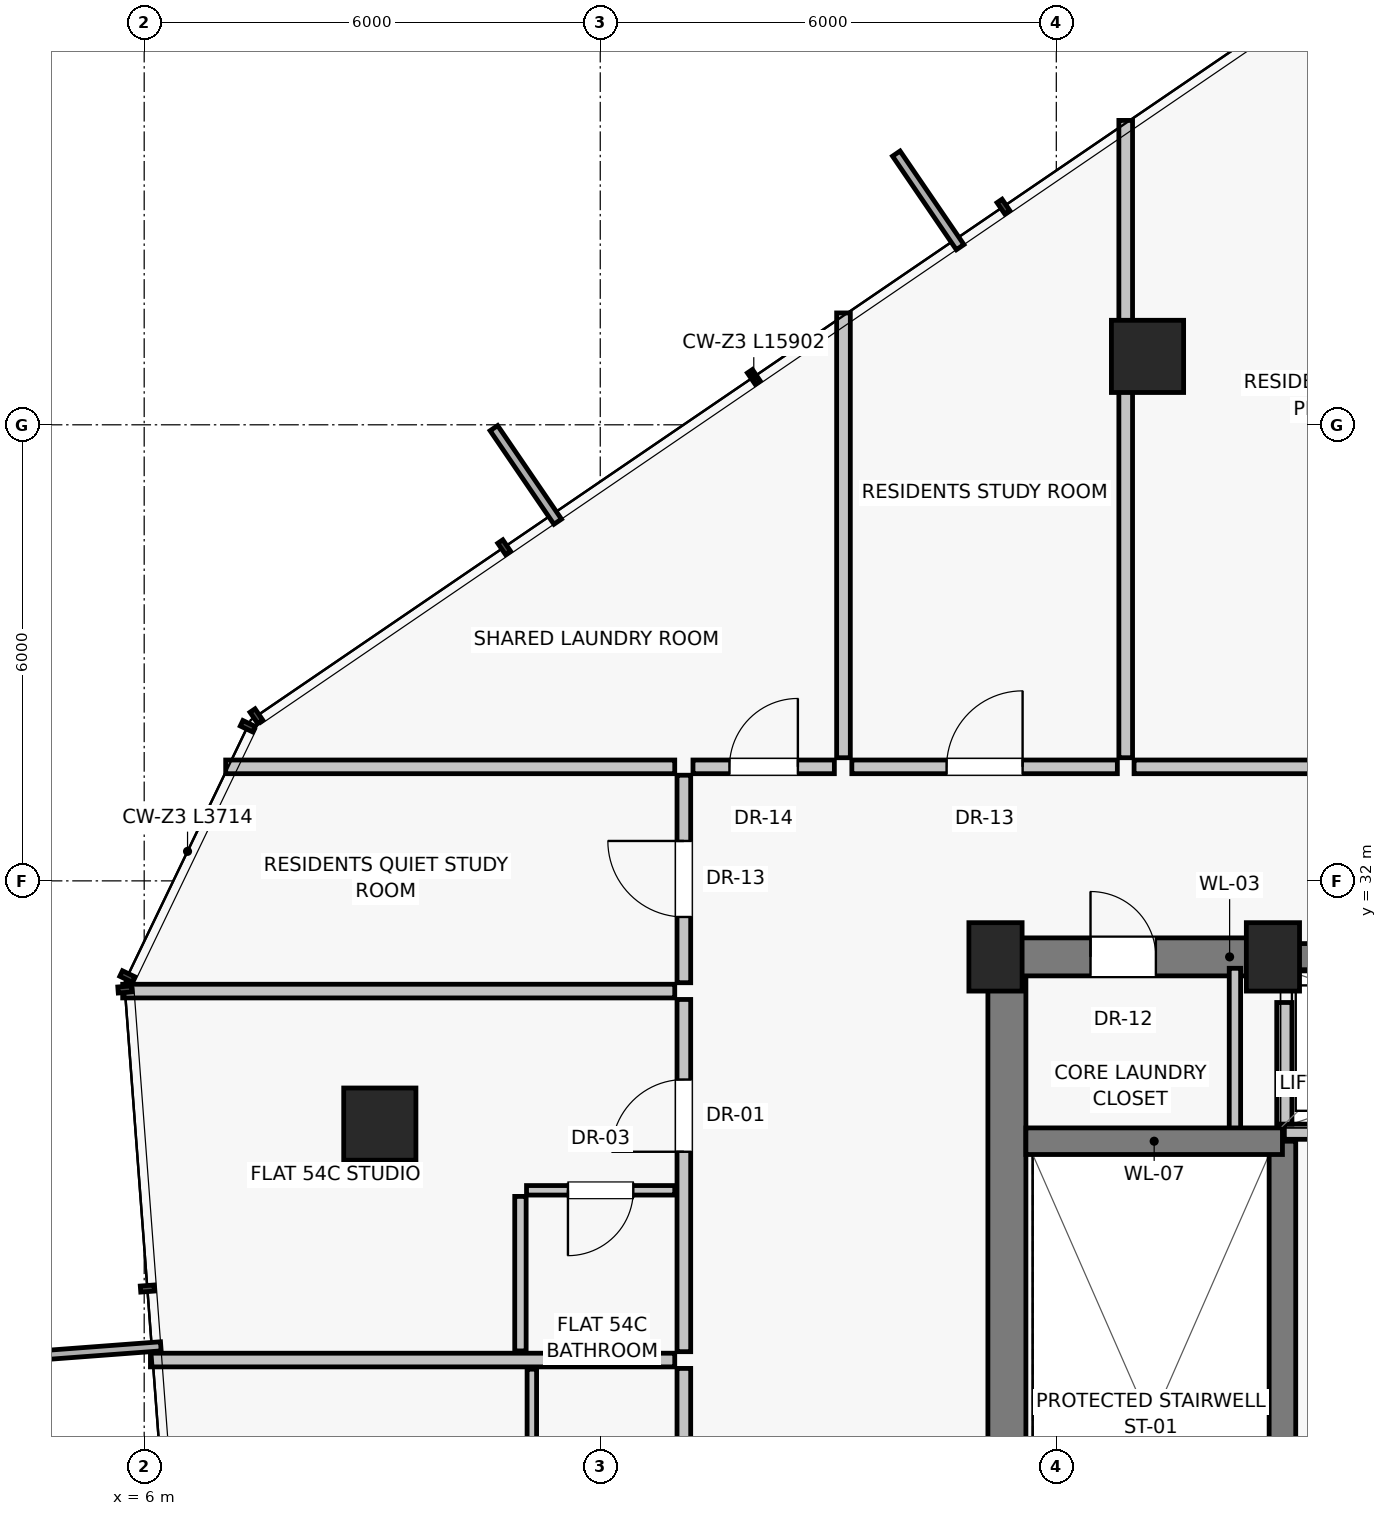
"""IFC4 building model, lengths in metres.
Left out: names, types, materials, properties, quantities, classifications, styles, units other than length and angle.
Written with IfcOpenShell. Run it as: python <this file> out.ifc"""

import sys

from ifc_helpers import new_model, si_unit, direction, frame, frame_2d, origin, origin_2d, place, context, subcontext, project, spatial, rectangle, extrude, source, transform, mapped, element, fill, save


model = new_model("IFC4")
c1 = context("Model", 3, precision=1e-05, world=origin(), true_north=direction((0.0, 1.0)))
c2 = subcontext(c1, "Body", "Model", "MODEL_VIEW")
j1 = project(units=[si_unit("LENGTHUNIT", "METRE"), si_unit("PLANEANGLEUNIT", "RADIAN")], contexts=[c1])
p1 = place(None, origin())
s1 = spatial("IfcSite", under=j1, at=p1, CompositionType="ELEMENT")
p2 = place(p1, origin())
s2 = spatial("IfcBuilding", under=s1, at=p2, CompositionType="ELEMENT")
p3 = place(p2, frame((0.0, 0.0, 191.85)))
s3 = spatial("IfcBuildingStorey", under=s2, at=p3, CompositionType="ELEMENT", Elevation=191.85)
for number, where, z_axis, x_axis in (
    (1, (17.2, 31.0, 0.0), (0.0, 0.0, 1.0), (1.0, 0.0, 0.0)),
    (2, (20.85, 31.0, 0.0), (0.0, 0.0, 1.0), (1.0, 0.0, 0.0)),
):
    element("IfcColumn", number, at=place(p3, frame(where, z_axis=z_axis, x_axis=x_axis)), inside=s3, PredefinedType="PILASTER", context=c2, shape_type="SweptSolid", body=[
        extrude(rectangle(XDim=0.7, YDim=0.9, at=origin_2d()), origin(), (0.0, 0.0, 1.0), 3.25),
    ])
for number, where, z_axis, x_axis in (
    (3, (19.2, 38.9, 0.0), (0.0, 0.0, 1.0), (1.0, 0.0, 0.0)),
    (4, (9.1, 28.8, 0.0), (0.0, 0.0, 1.0), (1.0, 0.0, 0.0)),
):
    element("IfcColumn", number, at=place(p3, frame(where, z_axis=z_axis, x_axis=x_axis)), inside=s3, PredefinedType="COLUMN", context=c2, shape_type="SweptSolid", body=[
        extrude(rectangle(XDim=0.95, YDim=0.95, at=origin_2d()), origin(), (0.0, 0.0, 1.0), 3.25),
    ])
p4 = place(p3, frame((17.35, 16.8, 0.0), z_axis=(0.0, 0.0, 1.0), x_axis=(0.0, 1.0, 0.0)))
e5 = element("IfcWall", 5, at=p4, inside=s3, PredefinedType="SHEAR", context=c2, shape_type="SweptSolid", body=[
    extrude(rectangle(XDim=14.2, YDim=0.5, at=frame_2d((7.1, 0.0))), origin(), (0.0, 0.0, 1.0), 3.015),
])
p5 = place(p3, frame((17.2, 31.0, 0.0), z_axis=(0.0, 0.0, 1.0), x_axis=(1.0, 0.0, 0.0)))
e6 = element("IfcWall", 6, at=p5, inside=s3, PredefinedType="SHEAR", context=c2, shape_type="SweptSolid", body=[
    extrude(rectangle(XDim=3.8, YDim=0.5, at=frame_2d((1.9, 0.0))), origin(), (0.0, 0.0, 1.0), 3.015),
])
p6 = place(p5, frame((1.25, 0.0, 0.0)))
e7 = element("IfcOpeningElement", 7, at=p6, cuts=e6, PredefinedType="OPENING", context=c2, shape_type="SweptSolid", body=[
    extrude(rectangle(XDim=0.86, YDim=2.01, at=frame_2d((0.43, 1.005))), frame((0.0, 0.26, 0.0), z_axis=(0.0, -1.0, 0.0), x_axis=(1.0, 0.0, 0.0)), (0.0, 0.0, 1.0), 0.52),
])
p7 = place(p3, frame((21.0, 31.0, 0.0), z_axis=(0.0, 0.0, 1.0), x_axis=(1.0, 0.0, 0.0)))
e8 = element("IfcWall", 8, at=p7, inside=s3, PredefinedType="SHEAR", context=c2, shape_type="SweptSolid", body=[
    extrude(rectangle(XDim=6.0, YDim=0.35, at=frame_2d((3.0, 0.0))), origin(), (0.0, 0.0, 1.0), 3.015),
])
p8 = place(p7, frame((0.5, 0.0, 0.0)))
e9 = element("IfcOpeningElement", 9, at=p8, cuts=e8, PredefinedType="OPENING", context=c2, shape_type="SweptSolid", body=[
    extrude(rectangle(XDim=1.1, YDim=2.08, at=frame_2d((0.55, 1.04))), frame((0.0, 0.185, 0.0), z_axis=(0.0, -1.0, 0.0), x_axis=(1.0, 0.0, 0.0)), (0.0, 0.0, 1.0), 0.37),
])
p9 = place(p7, frame((2.45, 0.0, 0.0)))
e10 = element("IfcOpeningElement", 10, at=p9, cuts=e8, PredefinedType="OPENING", context=c2, shape_type="SweptSolid", body=[
    extrude(rectangle(XDim=1.1, YDim=2.08, at=frame_2d((0.55, 1.04))), frame((0.0, 0.185, 0.0), z_axis=(0.0, -1.0, 0.0), x_axis=(1.0, 0.0, 0.0)), (0.0, 0.0, 1.0), 0.37),
])
p10 = place(p7, frame((4.4, 0.0, 0.0)))
e11 = element("IfcOpeningElement", 11, at=p10, cuts=e8, PredefinedType="OPENING", context=c2, shape_type="SweptSolid", body=[
    extrude(rectangle(XDim=1.1, YDim=2.08, at=frame_2d((0.55, 1.04))), frame((0.0, 0.185, 0.0), z_axis=(0.0, -1.0, 0.0), x_axis=(1.0, 0.0, 0.0)), (0.0, 0.0, 1.0), 0.37),
])
p11 = place(p3, frame((20.35, 28.65, 0.0), z_axis=(0.0, 0.0, 1.0), x_axis=(0.0, 1.0, 0.0)))
e12 = element("IfcWall", 12, at=p11, inside=s3, PredefinedType="PARTITIONING", context=c2, shape_type="SweptSolid", body=[
    extrude(rectangle(XDim=2.2, YDim=0.15, at=frame_2d((1.1, 0.0))), origin(), (0.0, 0.0, 1.0), 3.015),
])
p12 = place(p3, frame((20.975, 19.8, 0.0), z_axis=(0.0, 0.0, 1.0), x_axis=(0.0, 1.0, 0.0)))
e13 = element("IfcWall", 13, at=p12, inside=s3, PredefinedType="SHEAR", context=c2, shape_type="SweptSolid", body=[
    extrude(rectangle(XDim=8.775, YDim=0.35, at=frame_2d((4.387, 0.0))), origin(), (0.0, 0.0, 1.0), 3.015),
])
p13 = place(p3, frame((17.6, 28.575, 0.0), z_axis=(0.0, 0.0, 1.0), x_axis=(1.0, 0.0, 0.0)))
e14 = element("IfcWall", 14, at=p13, inside=s3, PredefinedType="SHEAR", context=c2, shape_type="SweptSolid", body=[
    extrude(rectangle(XDim=3.375, YDim=0.35, at=frame_2d((1.688, 0.0))), origin(), (0.0, 0.0, 1.0), 3.015),
])
p14 = place(p3, frame((21.0, 28.7, 0.0), z_axis=(0.0, 0.0, 1.0), x_axis=(1.0, 0.0, 0.0)))
e15 = element("IfcWall", 15, at=p14, inside=s3, PredefinedType="SOLIDWALL", context=c2, shape_type="SweptSolid", body=[
    extrude(rectangle(XDim=6.0, YDim=0.2, at=frame_2d((3.0, 0.0))), origin(), (0.0, 0.0, 1.0), 3.015),
])
p15 = place(p3, frame((21.0, 28.8, 0.0), z_axis=(0.0, 0.0, 1.0), x_axis=(0.0, 1.0, 0.0)))
e16 = element("IfcWall", 16, at=p15, inside=s3, PredefinedType="SOLIDWALL", context=c2, shape_type="SweptSolid", body=[
    extrude(rectangle(XDim=1.6, YDim=0.2, at=frame_2d((0.8, 0.0))), origin(), (0.0, 0.0, 1.0), 3.015),
])
p16 = place(p3, frame((15.2, 33.62, 0.0), z_axis=(0.0, 0.0, 1.0), x_axis=(0.0, 1.0, 0.0)))
e17 = element("IfcWall", 17, at=p16, inside=s3, PredefinedType="PARTITIONING", context=c2, shape_type="SweptSolid", body=[
    extrude(rectangle(XDim=5.852, YDim=0.18, at=frame_2d((2.926, 0.0))), origin(), (0.0, 0.0, 1.0), 3.015),
])
p17 = place(p3, frame((15.31, 33.5, 0.0), z_axis=(0.0, 0.0, 1.0), x_axis=(1.0, 0.0, 0.0)))
e18 = element("IfcWall", 18, at=p17, inside=s3, PredefinedType="PARTITIONING", context=c2, shape_type="SweptSolid", body=[
    extrude(rectangle(XDim=3.493, YDim=0.18, at=frame_2d((1.747, 0.0))), origin(), (0.0, 0.0, 1.0), 3.015),
])
p18 = place(p17, frame((1.247, 0.0, 0.0)))
e19 = element("IfcOpeningElement", 19, at=p18, cuts=e18, PredefinedType="OPENING", context=c2, shape_type="SweptSolid", body=[
    extrude(rectangle(XDim=1.0, YDim=2.01, at=frame_2d((0.5, 1.005))), frame((0.0, 0.1, 0.0), z_axis=(0.0, -1.0, 0.0), x_axis=(1.0, 0.0, 0.0)), (0.0, 0.0, 1.0), 0.2),
])
p19 = place(p3, frame((19.023, 33.5, 0.0), z_axis=(0.0, 0.0, 1.0), x_axis=(1.0, 0.0, 0.0)))
e20 = element("IfcWall", 20, at=p19, inside=s3, PredefinedType="PARTITIONING", context=c2, shape_type="SweptSolid", body=[
    extrude(rectangle(XDim=5.837, YDim=0.18, at=frame_2d((2.918, 0.0))), origin(), (0.0, 0.0, 1.0), 3.015),
])
p20 = place(p19, frame((2.418, 0.0, 0.0)))
e21 = element("IfcOpeningElement", 21, at=p20, cuts=e20, PredefinedType="OPENING", context=c2, shape_type="SweptSolid", body=[
    extrude(rectangle(XDim=1.0, YDim=2.01, at=frame_2d((0.5, 1.005))), frame((0.0, 0.1, 0.0), z_axis=(0.0, -1.0, 0.0), x_axis=(1.0, 0.0, 0.0)), (0.0, 0.0, 1.0), 0.2),
])
p21 = place(p3, frame((18.913, 33.62, 0.0), z_axis=(0.0, 0.0, 1.0), x_axis=(0.0, 1.0, 0.0)))
e22 = element("IfcWall", 22, at=p21, inside=s3, PredefinedType="PARTITIONING", context=c2, shape_type="SweptSolid", body=[
    extrude(rectangle(XDim=8.385, YDim=0.18, at=frame_2d((4.192, 0.0))), origin(), (0.0, 0.0, 1.0), 2.469),
])
p22 = place(p3, frame((12.98, 33.5, 0.0), z_axis=(0.0, 0.0, 1.0), x_axis=(-1.0, 0.0, 0.0)))
e23 = element("IfcWall", 23, at=p22, inside=s3, PredefinedType="PARTITIONING", context=c2, shape_type="SweptSolid", body=[
    extrude(rectangle(XDim=5.908, YDim=0.18, at=frame_2d((2.954, 0.0))), origin(), (0.0, 0.0, 1.0), 3.015),
])
p23 = place(p3, frame((13.1, 14.41, 0.0), z_axis=(0.0, 0.0, 1.0), x_axis=(0.0, 1.0, 0.0)))
e24 = element("IfcWall", 24, at=p23, inside=s3, PredefinedType="PARTITIONING", context=c2, shape_type="SweptSolid", body=[
    extrude(rectangle(XDim=11.176, YDim=0.18, at=frame_2d((5.588, 0.0))), origin(), (0.0, 0.0, 1.0), 2.662),
])
p24 = place(p23, frame((3.674, 0.0, 0.0)))
e25 = element("IfcOpeningElement", 25, at=p24, cuts=e24, PredefinedType="OPENING", context=c2, shape_type="SweptSolid", body=[
    extrude(rectangle(XDim=0.95, YDim=2.02, at=frame_2d((0.475, 1.01))), frame((0.0, 0.1, 0.0), z_axis=(0.0, -1.0, 0.0), x_axis=(1.0, 0.0, 0.0)), (0.0, 0.0, 1.0), 0.2),
])
p25 = place(p3, frame((11.1, 20.668, 0.0), z_axis=(0.0, 0.0, 1.0), x_axis=(0.0, 1.0, 0.0)))
e26 = element("IfcWall", 26, at=p25, inside=s3, PredefinedType="PARTITIONING", context=c2, shape_type="SweptSolid", body=[
    extrude(rectangle(XDim=4.908, YDim=0.125, at=frame_2d((2.454, 0.0))), origin(), (0.0, 0.0, 1.0), 3.015),
])
p26 = place(p3, frame((12.98, 25.696, 0.0), z_axis=(0.0, 0.0, 1.0), x_axis=(-1.0, 0.0, 0.0)))
e27 = element("IfcWall", 27, at=p26, inside=s3, PredefinedType="PARTITIONING", context=c2, shape_type="SweptSolid", body=[
    extrude(rectangle(XDim=6.898, YDim=0.18, at=frame_2d((3.449, 0.0))), origin(), (0.0, 0.0, 1.0), 3.015),
])
p27 = place(p3, frame((13.1, 30.66, 0.0), z_axis=(0.0, 0.0, 1.0), x_axis=(0.0, 1.0, 0.0)))
e28 = element("IfcWall", 28, at=p27, inside=s3, PredefinedType="PARTITIONING", context=c2, shape_type="SweptSolid", body=[
    extrude(rectangle(XDim=2.73, YDim=0.18, at=frame_2d((1.365, 0.0))), origin(), (0.0, 0.0, 1.0), 3.015),
])
p28 = place(p27, frame((0.865, 0.0, 0.0)))
e29 = element("IfcOpeningElement", 29, at=p28, cuts=e28, PredefinedType="OPENING", context=c2, shape_type="SweptSolid", body=[
    extrude(rectangle(XDim=1.0, YDim=2.01, at=frame_2d((0.5, 1.005))), frame((0.0, 0.1, 0.0), z_axis=(0.0, -1.0, 0.0), x_axis=(1.0, 0.0, 0.0)), (0.0, 0.0, 1.0), 0.2),
])
p29 = place(p3, frame((12.98, 30.55, 0.0), z_axis=(0.0, 0.0, 1.0), x_axis=(-1.0, 0.0, 0.0)))
e30 = element("IfcWall", 30, at=p29, inside=s3, PredefinedType="PARTITIONING", context=c2, shape_type="SweptSolid", body=[
    extrude(rectangle(XDim=7.263, YDim=0.18, at=frame_2d((3.631, 0.0))), origin(), (0.0, 0.0, 1.0), 3.015),
])
p30 = place(p3, frame((13.1, 25.806, 0.0), z_axis=(0.0, 0.0, 1.0), x_axis=(0.0, 1.0, 0.0)))
e31 = element("IfcWall", 31, at=p30, inside=s3, PredefinedType="PARTITIONING", context=c2, shape_type="SweptSolid", body=[
    extrude(rectangle(XDim=4.634, YDim=0.18, at=frame_2d((2.317, 0.0))), origin(), (0.0, 0.0, 1.0), 2.662),
])
p31 = place(p30, frame((2.63, 0.0, 0.0)))
e32 = element("IfcOpeningElement", 32, at=p31, cuts=e31, PredefinedType="OPENING", context=c2, shape_type="SweptSolid", body=[
    extrude(rectangle(XDim=0.95, YDim=2.02, at=frame_2d((0.475, 1.01))), frame((0.0, 0.1, 0.0), z_axis=(0.0, -1.0, 0.0), x_axis=(1.0, 0.0, 0.0)), (0.0, 0.0, 1.0), 0.2),
])
p32 = place(p3, frame((12.98, 27.929, 0.0), z_axis=(0.0, 0.0, 1.0), x_axis=(-1.0, 0.0, 0.0)))
e33 = element("IfcWall", 33, at=p32, inside=s3, PredefinedType="PARTITIONING", context=c2, shape_type="SweptSolid", body=[
    extrude(rectangle(XDim=1.95, YDim=0.125, at=frame_2d((0.975, 0.0))), origin(), (0.0, 0.0, 1.0), 3.015),
])
p33 = place(p32, frame((0.545, 0.0, 0.0)))
e34 = element("IfcOpeningElement", 34, at=p33, cuts=e33, PredefinedType="OPENING", context=c2, shape_type="SweptSolid", body=[
    extrude(rectangle(XDim=0.86, YDim=2.01, at=frame_2d((0.43, 1.005))), frame((0.0, 0.073, 0.0), z_axis=(0.0, -1.0, 0.0), x_axis=(1.0, 0.0, 0.0)), (0.0, 0.0, 1.0), 0.145),
])
p34 = place(p3, frame((10.95, 25.816, 0.0), z_axis=(0.0, 0.0, 1.0), x_axis=(0.0, 1.0, 0.0)))
e35 = element("IfcWall", 35, at=p34, inside=s3, PredefinedType="PARTITIONING", context=c2, shape_type="SweptSolid", body=[
    extrude(rectangle(XDim=2.033, YDim=0.15, at=frame_2d((1.017, 0.0))), origin(), (0.0, 0.0, 1.0), 3.015),
])
p35 = place(p3, frame((13.22, 33.5, 0.0), z_axis=(0.0, 0.0, 1.0), x_axis=(1.0, 0.0, 0.0)))
e36 = element("IfcWall", 36, at=p35, inside=s3, PredefinedType="PARTITIONING", context=c2, shape_type="SweptSolid", body=[
    extrude(rectangle(XDim=1.86, YDim=0.18, at=frame_2d((0.93, 0.0))), origin(), (0.0, 0.0, 1.0), 3.015),
])
p36 = place(p35, frame((0.48, 0.0, 0.0)))
e37 = element("IfcOpeningElement", 37, at=p36, cuts=e36, PredefinedType="OPENING", context=c2, shape_type="SweptSolid", body=[
    extrude(rectangle(XDim=0.9, YDim=2.01, at=frame_2d((0.45, 1.005))), frame((0.0, 0.1, 0.0), z_axis=(0.0, -1.0, 0.0), x_axis=(1.0, 0.0, 0.0)), (0.0, 0.0, 1.0), 0.2),
])
m1 = source(origin(), c2, "Body", "SweptSolid", [
    extrude(rectangle(XDim=0.86, YDim=2.01, at=frame_2d((0.43, 1.005))), frame((0.0, 0.025, 0.0), z_axis=(0.0, -1.0, 0.0), x_axis=(1.0, 0.0, 0.0)), (0.0, 0.0, 1.0), 0.05),
])
p37 = place(p6, origin())
e38 = element("IfcDoor", 38, at=p37, inside=s3, OperationType="SINGLE_SWING_LEFT", PredefinedType="DOOR", context=c2, shape_type="MappedRepresentation", body=[
    mapped(m1, transform((0.0, 0.0, 0.0), scale=1.0)),
])
fill(e7, e38)
m2 = source(origin(), c2, "Body", "SweptSolid", [
    extrude(rectangle(XDim=1.0, YDim=2.01, at=frame_2d((0.5, 1.005))), frame((0.0, 0.025, 0.0), z_axis=(0.0, -1.0, 0.0), x_axis=(1.0, 0.0, 0.0)), (0.0, 0.0, 1.0), 0.05),
])
p38 = place(p18, origin())
e39 = element("IfcDoor", 39, at=p38, inside=s3, OperationType="SINGLE_SWING_RIGHT", PredefinedType="DOOR", context=c2, shape_type="MappedRepresentation", body=[
    mapped(m2, transform((0.0, 0.0, 0.0), scale=1.0)),
])
fill(e19, e39)
p39 = place(p28, origin())
e40 = element("IfcDoor", 40, at=p39, inside=s3, OperationType="SINGLE_SWING_RIGHT", PredefinedType="DOOR", context=c2, shape_type="MappedRepresentation", body=[
    mapped(m2, transform((0.0, 0.0, 0.0), scale=1.0)),
])
fill(e29, e40)
m3 = source(origin(), c2, "Body", "SweptSolid", [
    extrude(rectangle(XDim=0.95, YDim=2.02, at=frame_2d((0.475, 1.01))), frame((0.0, 0.025, 0.0), z_axis=(0.0, -1.0, 0.0), x_axis=(1.0, 0.0, 0.0)), (0.0, 0.0, 1.0), 0.05),
])
p40 = place(p31, origin())
e41 = element("IfcDoor", 41, at=p40, inside=s3, OperationType="SINGLE_SWING_LEFT", PredefinedType="DOOR", context=c2, shape_type="MappedRepresentation", body=[
    mapped(m3, transform((0.0, 0.0, 0.0), scale=1.0)),
])
fill(e32, e41)
p41 = place(p33, origin())
e42 = element("IfcDoor", 42, at=p41, inside=s3, OperationType="SINGLE_SWING_RIGHT", PredefinedType="DOOR", context=c2, shape_type="MappedRepresentation", body=[
    mapped(m1, transform((0.0, 0.0, 0.0), scale=1.0)),
])
fill(e34, e42)
m4 = source(origin(), c2, "Body", "SweptSolid", [
    extrude(rectangle(XDim=0.9, YDim=2.01, at=frame_2d((0.45, 1.005))), frame((0.0, 0.025, 0.0), z_axis=(0.0, -1.0, 0.0), x_axis=(1.0, 0.0, 0.0)), (0.0, 0.0, 1.0), 0.05),
])
p42 = place(p36, origin())
e43 = element("IfcDoor", 43, at=p42, inside=s3, OperationType="SINGLE_SWING_RIGHT", PredefinedType="DOOR", context=c2, shape_type="MappedRepresentation", body=[
    mapped(m4, transform((0.0, 0.0, 0.0), scale=1.0)),
])
fill(e37, e43)
save(model, sys.argv[1])
